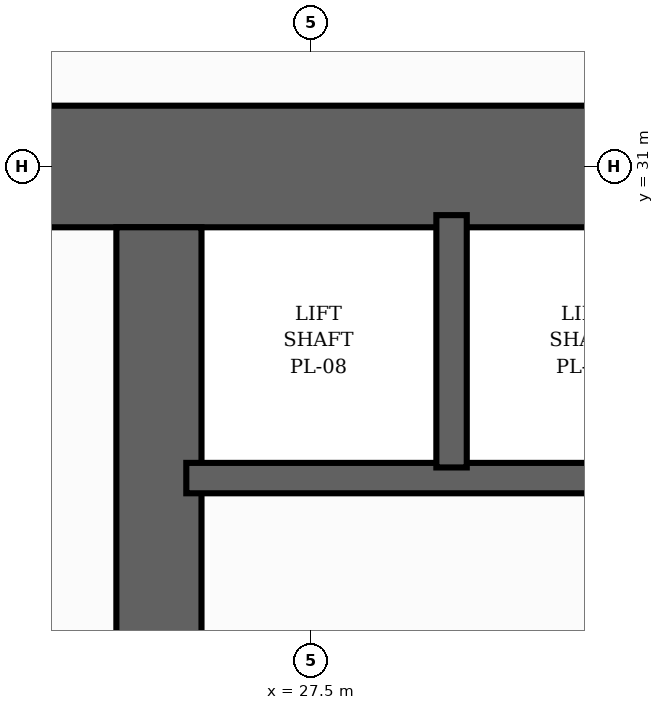
"""IFC4 building model, lengths in metres.
Left out: names, types, materials, properties, quantities, classifications, styles, units other than length and angle.
Written with IfcOpenShell. Run it as: python <this file> out.ifc"""

import sys

from ifc_helpers import new_model, si_unit, direction, frame, frame_2d, origin, place, context, subcontext, project, spatial, rectangle, extrude, element, save


model = new_model("IFC4")
c1 = context("Model", 3, precision=1e-05, world=origin(), true_north=direction((0.0, 1.0)))
c2 = subcontext(c1, "Body", "Model", "MODEL_VIEW")
j1 = project(units=[si_unit("LENGTHUNIT", "METRE"), si_unit("PLANEANGLEUNIT", "RADIAN")], contexts=[c1])
p1 = place(None, origin())
s1 = spatial("IfcSite", under=j1, at=p1, CompositionType="ELEMENT")
p2 = place(p1, origin())
s2 = spatial("IfcBuilding", under=s1, at=p2, CompositionType="ELEMENT")
p3 = place(p2, frame((0.0, 0.0, 8.0)))
s3 = spatial("IfcBuildingStorey", under=s2, at=p3, CompositionType="ELEMENT", Elevation=8.0)
p4 = place(p3, frame((22.6, 31.0, 0.0), z_axis=(0.0, 0.0, 1.0), x_axis=(1.0, 0.0, 0.0)))
e1 = element("IfcWall", 1, at=p4, inside=s3, PredefinedType="SHEAR", context=c2, shape_type="SweptSolid", body=[
    extrude(rectangle(XDim=18.8, YDim=0.8, at=frame_2d((9.4, 0.0))), origin(), (0.0, 0.0, 1.0), 4.0),
])
p5 = place(p4, frame((11.8, 0.0, 0.0)))
e2 = element("IfcOpeningElement", 2, at=p5, cuts=e1, PredefinedType="OPENING", context=c2, shape_type="SweptSolid", body=[
    extrude(rectangle(XDim=1.1, YDim=2.15, at=frame_2d((0.55, 1.075))), frame((0.0, 0.41, 0.0), z_axis=(0.0, -1.0, 0.0), x_axis=(1.0, 0.0, 0.0)), (0.0, 0.0, 1.0), 0.82),
])
p6 = place(p3, frame((26.5, 17.4, 0.0), z_axis=(0.0, 0.0, 1.0), x_axis=(0.0, 1.0, 0.0)))
e3 = element("IfcWall", 3, at=p6, inside=s3, PredefinedType="SHEAR", context=c2, shape_type="SweptSolid", body=[
    extrude(rectangle(XDim=13.2, YDim=0.56, at=frame_2d((6.6, 0.0))), origin(), (0.0, 0.0, 1.0), 4.0),
])
p7 = place(p3, frame((26.68, 28.95, 0.0), z_axis=(0.0, 0.0, 1.0), x_axis=(1.0, 0.0, 0.0)))
e4 = element("IfcWall", 4, at=p7, inside=s3, PredefinedType="SHEAR", context=c2, shape_type="SweptSolid", body=[
    extrude(rectangle(XDim=5.24, YDim=0.2, at=frame_2d((2.62, 0.0))), origin(), (0.0, 0.0, 1.0), 4.0),
])
p8 = place(p3, frame((28.425, 29.02, 0.0), z_axis=(0.0, 0.0, 1.0), x_axis=(0.0, 1.0, 0.0)))
e5 = element("IfcWall", 5, at=p8, inside=s3, PredefinedType="SHEAR", context=c2, shape_type="SweptSolid", body=[
    extrude(rectangle(XDim=1.66, YDim=0.2, at=frame_2d((0.83, 0.0))), origin(), (0.0, 0.0, 1.0), 4.0),
])
save(model, sys.argv[1])
